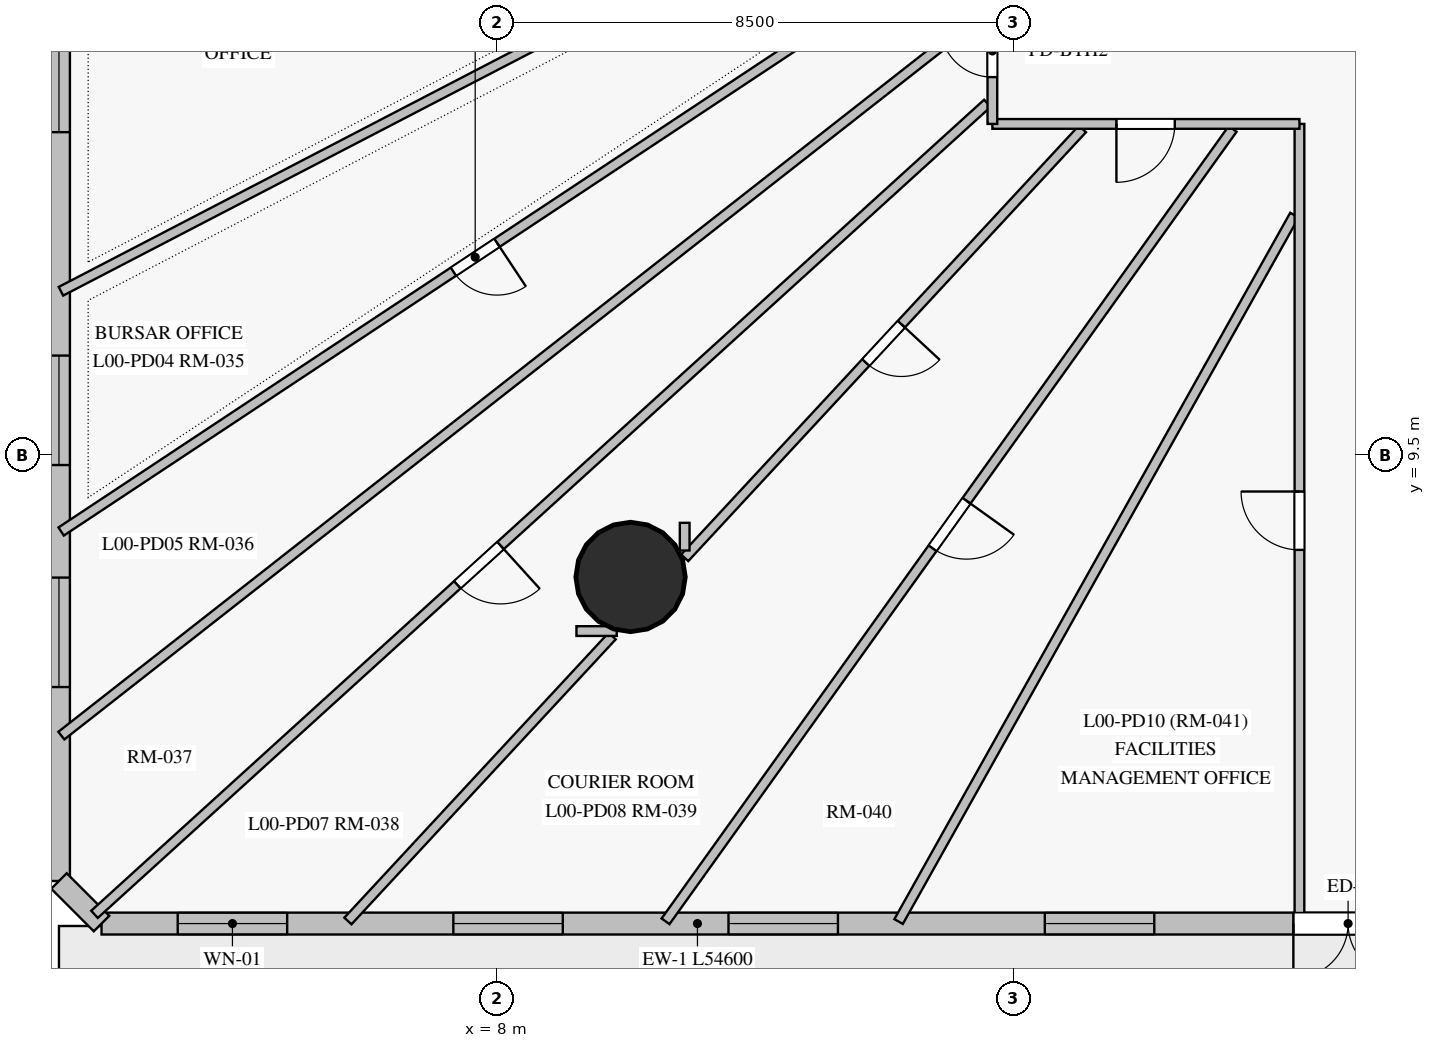
"""IFC4 building model, lengths in metres.
Left out: names, types, materials, properties, quantities, classifications, styles, units other than length and angle.
Written with IfcOpenShell. Run it as: python <this file> out.ifc"""

import sys

from ifc_helpers import new_model, si_unit, direction, frame, frame_2d, origin, origin_with_axes, origin_2d, place, context, subcontext, project, spatial, rectangle, circle, extrude, source, transform, mapped, element, fill, save


model = new_model("IFC4")
c1 = context("Model", 3, precision=1e-05, world=origin(), true_north=direction((0.0, 1.0)))
c2 = subcontext(c1, "Body", "Model", "MODEL_VIEW")
j1 = project(units=[si_unit("LENGTHUNIT", "METRE"), si_unit("PLANEANGLEUNIT", "RADIAN")], contexts=[c1])
p1 = place(None, origin())
s1 = spatial("IfcSite", under=j1, at=p1, CompositionType="ELEMENT")
p2 = place(p1, origin())
s2 = spatial("IfcBuilding", under=s1, at=p2, CompositionType="ELEMENT")
p3 = place(p2, origin())
s3 = spatial("IfcBuildingStorey", under=s2, at=p3, CompositionType="ELEMENT", Elevation=0.0)
m1 = source(origin_with_axes(), c2, "Body", "SweptSolid", [
    extrude(circle(Radius=0.9, at=origin_2d()), origin(), (0.0, 0.0, 1.0), 4.5),
])
p4 = place(p3, frame((10.2, 7.5, 0.0), z_axis=(0.0, 0.0, 1.0), x_axis=(1.0, 0.0, 0.0)))
e1 = element("IfcColumn", 1, at=p4, inside=s3, PredefinedType="COLUMN", context=c2, shape_type="MappedRepresentation", body=[
    mapped(m1, transform((0.0, 0.0, 0.0), scale=1.0)),
])
p5 = place(p3, frame((56.1, 1.8, 0.0), z_axis=(0.0, 0.0, 1.0), x_axis=(-1.0, 0.0, 0.0)))
e2 = element("IfcWall", 2, at=p5, inside=s3, PredefinedType="SOLIDWALL", context=c2, shape_type="SweptSolid", body=[
    extrude(rectangle(XDim=54.6, YDim=0.36, at=frame_2d((27.3, 0.0))), origin(), (0.0, 0.0, 1.0), 4.2),
])
p6 = place(p5, frame((51.547, 0.0, 0.85)))
e3 = element("IfcOpeningElement", 3, at=p6, cuts=e2, PredefinedType="OPENING", context=c2, shape_type="SweptSolid", body=[
    extrude(rectangle(XDim=1.8, YDim=2.2, at=frame_2d((0.9, 1.1))), frame((0.0, 0.19, 0.0), z_axis=(0.0, -1.0, 0.0), x_axis=(1.0, 0.0, 0.0)), (0.0, 0.0, 1.0), 0.38),
])
p7 = place(p5, frame((47.014, 0.0, 0.85)))
e4 = element("IfcOpeningElement", 4, at=p7, cuts=e2, PredefinedType="OPENING", context=c2, shape_type="SweptSolid", body=[
    extrude(rectangle(XDim=1.8, YDim=2.2, at=frame_2d((0.9, 1.1))), frame((0.0, 0.19, 0.0), z_axis=(0.0, -1.0, 0.0), x_axis=(1.0, 0.0, 0.0)), (0.0, 0.0, 1.0), 0.38),
])
p8 = place(p5, frame((42.49, 0.0, 0.85)))
e5 = element("IfcOpeningElement", 5, at=p8, cuts=e2, PredefinedType="OPENING", context=c2, shape_type="SweptSolid", body=[
    extrude(rectangle(XDim=1.8, YDim=2.2, at=frame_2d((0.9, 1.1))), frame((0.0, 0.19, 0.0), z_axis=(0.0, -1.0, 0.0), x_axis=(1.0, 0.0, 0.0)), (0.0, 0.0, 1.0), 0.38),
])
p9 = place(p5, frame((37.288, 0.0, 0.85)))
e6 = element("IfcOpeningElement", 6, at=p9, cuts=e2, PredefinedType="OPENING", context=c2, shape_type="SweptSolid", body=[
    extrude(rectangle(XDim=1.8, YDim=2.2, at=frame_2d((0.9, 1.1))), frame((0.0, 0.19, 0.0), z_axis=(0.0, -1.0, 0.0), x_axis=(1.0, 0.0, 0.0)), (0.0, 0.0, 1.0), 0.38),
])
p10 = place(p5, frame((25.176, 0.0, 0.85)))
e7 = element("IfcOpeningElement", 7, at=p10, cuts=e2, PredefinedType="OPENING", context=c2, shape_type="SweptSolid", body=[
    extrude(rectangle(XDim=1.8, YDim=2.2, at=frame_2d((0.9, 1.1))), frame((0.0, 0.19, 0.0), z_axis=(0.0, -1.0, 0.0), x_axis=(1.0, 0.0, 0.0)), (0.0, 0.0, 1.0), 0.38),
])
p11 = place(p5, frame((17.162, 0.0, 0.85)))
e8 = element("IfcOpeningElement", 8, at=p11, cuts=e2, PredefinedType="OPENING", context=c2, shape_type="SweptSolid", body=[
    extrude(rectangle(XDim=1.8, YDim=2.2, at=frame_2d((0.9, 1.1))), frame((0.0, 0.19, 0.0), z_axis=(0.0, -1.0, 0.0), x_axis=(1.0, 0.0, 0.0)), (0.0, 0.0, 1.0), 0.38),
])
p12 = place(p5, frame((13.244, 0.0, 0.85)))
e9 = element("IfcOpeningElement", 9, at=p12, cuts=e2, PredefinedType="OPENING", context=c2, shape_type="SweptSolid", body=[
    extrude(rectangle(XDim=1.8, YDim=2.2, at=frame_2d((0.9, 1.1))), frame((0.0, 0.19, 0.0), z_axis=(0.0, -1.0, 0.0), x_axis=(1.0, 0.0, 0.0)), (0.0, 0.0, 1.0), 0.38),
])
p13 = place(p5, frame((6.25, 0.0, 0.85)))
e10 = element("IfcOpeningElement", 10, at=p13, cuts=e2, PredefinedType="OPENING", context=c2, shape_type="SweptSolid", body=[
    extrude(rectangle(XDim=1.8, YDim=2.2, at=frame_2d((0.9, 1.1))), frame((0.0, 0.19, 0.0), z_axis=(0.0, -1.0, 0.0), x_axis=(1.0, 0.0, 0.0)), (0.0, 0.0, 1.0), 0.38),
])
p14 = place(p5, frame((1.48, 0.0, 0.85)))
e11 = element("IfcOpeningElement", 11, at=p14, cuts=e2, PredefinedType="OPENING", context=c2, shape_type="SweptSolid", body=[
    extrude(rectangle(XDim=1.8, YDim=2.2, at=frame_2d((0.9, 1.1))), frame((0.0, 0.19, 0.0), z_axis=(0.0, -1.0, 0.0), x_axis=(1.0, 0.0, 0.0)), (0.0, 0.0, 1.0), 0.38),
])
p15 = place(p5, frame((33.2, 0.0, 0.0)))
e12 = element("IfcOpeningElement", 12, at=p15, cuts=e2, PredefinedType="OPENING", context=c2, shape_type="SweptSolid", body=[
    extrude(rectangle(XDim=1.8, YDim=2.3, at=frame_2d((0.9, 1.15))), frame((0.0, 0.19, 0.0), z_axis=(0.0, -1.0, 0.0), x_axis=(1.0, 0.0, 0.0)), (0.0, 0.0, 1.0), 0.38),
])
p16 = place(p5, frame((30.6, 0.0, 0.0)))
e13 = element("IfcOpeningElement", 13, at=p16, cuts=e2, PredefinedType="OPENING", context=c2, shape_type="SweptSolid", body=[
    extrude(rectangle(XDim=1.8, YDim=2.3, at=frame_2d((0.9, 1.15))), frame((0.0, 0.19, 0.0), z_axis=(0.0, -1.0, 0.0), x_axis=(1.0, 0.0, 0.0)), (0.0, 0.0, 1.0), 0.38),
])
p17 = place(p5, frame((10.6, 0.0, 0.0)))
e14 = element("IfcOpeningElement", 14, at=p17, cuts=e2, PredefinedType="OPENING", context=c2, shape_type="SweptSolid", body=[
    extrude(rectangle(XDim=1.8, YDim=2.3, at=frame_2d((0.9, 1.15))), frame((0.0, 0.19, 0.0), z_axis=(0.0, -1.0, 0.0), x_axis=(1.0, 0.0, 0.0)), (0.0, 0.0, 1.0), 0.38),
])
p18 = place(p3, frame((0.8, 2.5, 0.0), z_axis=(0.0, 0.0, 1.0), x_axis=(0.0, 1.0, 0.0)))
e15 = element("IfcWall", 15, at=p18, inside=s3, PredefinedType="SOLIDWALL", context=c2, shape_type="SweptSolid", body=[
    extrude(rectangle(XDim=48.0, YDim=0.36, at=frame_2d((24.0, 0.0))), origin(), (0.0, 0.0, 1.0), 4.2),
])
p19 = place(p18, frame((42.816, 0.0, 0.85)))
e16 = element("IfcOpeningElement", 16, at=p19, cuts=e15, PredefinedType="OPENING", context=c2, shape_type="SweptSolid", body=[
    extrude(rectangle(XDim=1.8, YDim=2.2, at=frame_2d((0.9, 1.1))), frame((0.0, 0.19, 0.0), z_axis=(0.0, -1.0, 0.0), x_axis=(1.0, 0.0, 0.0)), (0.0, 0.0, 1.0), 0.38),
])
p20 = place(p18, frame((38.338, 0.0, 0.85)))
e17 = element("IfcOpeningElement", 17, at=p20, cuts=e15, PredefinedType="OPENING", context=c2, shape_type="SweptSolid", body=[
    extrude(rectangle(XDim=1.8, YDim=2.2, at=frame_2d((0.9, 1.1))), frame((0.0, 0.19, 0.0), z_axis=(0.0, -1.0, 0.0), x_axis=(1.0, 0.0, 0.0)), (0.0, 0.0, 1.0), 0.38),
])
p21 = place(p18, frame((33.194, 0.0, 0.85)))
e18 = element("IfcOpeningElement", 18, at=p21, cuts=e15, PredefinedType="OPENING", context=c2, shape_type="SweptSolid", body=[
    extrude(rectangle(XDim=1.8, YDim=2.2, at=frame_2d((0.9, 1.1))), frame((0.0, 0.19, 0.0), z_axis=(0.0, -1.0, 0.0), x_axis=(1.0, 0.0, 0.0)), (0.0, 0.0, 1.0), 0.38),
])
p22 = place(p18, frame((29.492, 0.0, 0.85)))
e19 = element("IfcOpeningElement", 19, at=p22, cuts=e15, PredefinedType="OPENING", context=c2, shape_type="SweptSolid", body=[
    extrude(rectangle(XDim=1.8, YDim=2.2, at=frame_2d((0.9, 1.1))), frame((0.0, 0.19, 0.0), z_axis=(0.0, -1.0, 0.0), x_axis=(1.0, 0.0, 0.0)), (0.0, 0.0, 1.0), 0.38),
])
p23 = place(p18, frame((24.971, 0.0, 0.85)))
e20 = element("IfcOpeningElement", 20, at=p23, cuts=e15, PredefinedType="OPENING", context=c2, shape_type="SweptSolid", body=[
    extrude(rectangle(XDim=1.8, YDim=2.2, at=frame_2d((0.9, 1.1))), frame((0.0, 0.19, 0.0), z_axis=(0.0, -1.0, 0.0), x_axis=(1.0, 0.0, 0.0)), (0.0, 0.0, 1.0), 0.38),
])
p24 = place(p18, frame((12.315, 0.0, 0.85)))
e21 = element("IfcOpeningElement", 21, at=p24, cuts=e15, PredefinedType="OPENING", context=c2, shape_type="SweptSolid", body=[
    extrude(rectangle(XDim=1.8, YDim=2.2, at=frame_2d((0.9, 1.1))), frame((0.0, 0.19, 0.0), z_axis=(0.0, -1.0, 0.0), x_axis=(1.0, 0.0, 0.0)), (0.0, 0.0, 1.0), 0.38),
])
p25 = place(p18, frame((6.841, 0.0, 0.85)))
e22 = element("IfcOpeningElement", 22, at=p25, cuts=e15, PredefinedType="OPENING", context=c2, shape_type="SweptSolid", body=[
    extrude(rectangle(XDim=1.8, YDim=2.2, at=frame_2d((0.9, 1.1))), frame((0.0, 0.19, 0.0), z_axis=(0.0, -1.0, 0.0), x_axis=(1.0, 0.0, 0.0)), (0.0, 0.0, 1.0), 0.38),
])
p26 = place(p18, frame((3.189, 0.0, 0.85)))
e23 = element("IfcOpeningElement", 23, at=p26, cuts=e15, PredefinedType="OPENING", context=c2, shape_type="SweptSolid", body=[
    extrude(rectangle(XDim=1.8, YDim=2.2, at=frame_2d((0.9, 1.1))), frame((0.0, 0.19, 0.0), z_axis=(0.0, -1.0, 0.0), x_axis=(1.0, 0.0, 0.0)), (0.0, 0.0, 1.0), 0.38),
])
p27 = place(p18, frame((17.2, 0.0, 0.0)))
e24 = element("IfcOpeningElement", 24, at=p27, cuts=e15, PredefinedType="OPENING", context=c2, shape_type="SweptSolid", body=[
    extrude(rectangle(XDim=1.8, YDim=2.3, at=frame_2d((0.9, 1.15))), frame((0.0, 0.19, 0.0), z_axis=(0.0, -1.0, 0.0), x_axis=(1.0, 0.0, 0.0)), (0.0, 0.0, 1.0), 0.38),
])
p28 = place(p3, frame((0.8, 2.5, 0.0), z_axis=(0.0, 0.0, 1.0), x_axis=(0.707106781187, -0.707106781187, 0.0)))
e25 = element("IfcWall", 25, at=p28, inside=s3, PredefinedType="SOLIDWALL", context=c2, shape_type="SweptSolid", body=[
    extrude(rectangle(XDim=0.99, YDim=0.36, at=frame_2d((0.495, 0.0))), origin(), (0.0, 0.0, 1.0), 4.2),
])
p29 = place(p3, frame((16.068, 15.289, 0.0), z_axis=(0.0, 0.0, 1.0), x_axis=(-0.740229029454, -0.672354805109, 0.0)))
e26 = element("IfcWall", 26, at=p29, inside=s3, PredefinedType="PARTITIONING", context=c2, shape_type="SweptSolid", body=[
    extrude(rectangle(XDim=19.837, YDim=0.16, at=frame_2d((9.918, 0.0))), origin(), (0.0, 0.0, 1.0), 3.25),
])
p30 = place(p29, frame((10.816, 0.0, 0.0)))
e27 = element("IfcOpeningElement", 27, at=p30, cuts=e26, PredefinedType="OPENING", context=c2, shape_type="SweptSolid", body=[
    extrude(rectangle(XDim=0.96, YDim=2.15, at=frame_2d((0.48, 1.075))), frame((0.0, 0.09, 0.0), z_axis=(0.0, -1.0, 0.0), x_axis=(1.0, 0.0, 0.0)), (0.0, 0.0, 1.0), 0.18),
])
p31 = place(p3, frame((16.068, 16.83, 0.0), z_axis=(0.0, 0.0, 1.0), x_axis=(-0.786986378296, -0.616970372366, 0.0)))
e28 = element("IfcWall", 28, at=p31, inside=s3, PredefinedType="PARTITIONING", context=c2, shape_type="SweptSolid", body=[
    extrude(rectangle(XDim=19.351, YDim=0.16, at=frame_2d((9.676, 0.0))), origin(), (0.0, 0.0, 1.0), 4.2),
])
p32 = place(p3, frame((14.454, 17.268, 0.0), z_axis=(0.0, 0.0, 1.0), x_axis=(-0.83369067589, -0.55223170584, 0.0)))
e29 = element("IfcWall", 29, at=p32, inside=s3, PredefinedType="PARTITIONING", context=c2, shape_type="SweptSolid", body=[
    extrude(rectangle(XDim=16.335, YDim=0.16, at=frame_2d((8.167, 0.0))), origin(), (0.0, 0.0, 1.0), 4.2),
])
p33 = place(p32, frame((7.737, 0.0, 0.0)))
e30 = element("IfcOpeningElement", 30, at=p33, cuts=e29, PredefinedType="OPENING", context=c2, shape_type="SweptSolid", body=[
    extrude(rectangle(XDim=0.86, YDim=2.04, at=frame_2d((0.43, 1.02))), frame((0.0, 0.09, 0.0), z_axis=(0.0, -1.0, 0.0), x_axis=(1.0, 0.0, 0.0)), (0.0, 0.0, 1.0), 0.18),
])
p34 = place(p3, frame((20.101, 14.868, 0.0), z_axis=(0.0, 0.0, 1.0), x_axis=(-0.581991703878, -0.813194722448, 0.0)))
e31 = element("IfcWall", 31, at=p34, inside=s3, PredefinedType="PARTITIONING", context=c2, shape_type="SweptSolid", body=[
    extrude(rectangle(XDim=16.024, YDim=0.16, at=frame_2d((8.012, 0.0))), origin(), (0.0, 0.0, 1.0), 4.2),
])
p35 = place(p34, frame((7.52, 0.0, 0.0)))
e32 = element("IfcOpeningElement", 32, at=p35, cuts=e31, PredefinedType="OPENING", context=c2, shape_type="SweptSolid", body=[
    extrude(rectangle(XDim=0.96, YDim=2.15, at=frame_2d((0.48, 1.075))), frame((0.0, 0.09, 0.0), z_axis=(0.0, -1.0, 0.0), x_axis=(1.0, 0.0, 0.0)), (0.0, 0.0, 1.0), 0.18),
])
p36 = place(p3, frame((21.118, 13.45, 0.0), z_axis=(0.0, 0.0, 1.0), x_axis=(-0.488869643444, -0.872356848841, 0.0)))
e33 = element("IfcWall", 33, at=p36, inside=s3, PredefinedType="PARTITIONING", context=c2, shape_type="SweptSolid", body=[
    extrude(rectangle(XDim=13.316, YDim=0.16, at=frame_2d((6.658, 0.0))), origin(), (0.0, 0.0, 1.0), 4.2),
])
p37 = place(p3, frame((21.2, 1.965, 0.0), z_axis=(0.0, 0.0, 1.0), x_axis=(0.0, 1.0, 0.0)))
e34 = element("IfcWall", 34, at=p37, inside=s3, PredefinedType="PARTITIONING", context=c2, shape_type="SweptSolid", body=[
    extrude(rectangle(XDim=12.985, YDim=0.16, at=frame_2d((6.492, 0.0))), origin(), (0.0, 0.0, 1.0), 4.2),
])
p38 = place(p37, frame((5.98, 0.0, 0.0)))
e35 = element("IfcOpeningElement", 35, at=p38, cuts=e34, PredefinedType="OPENING", context=c2, shape_type="SweptSolid", body=[
    extrude(rectangle(XDim=0.96, YDim=2.15, at=frame_2d((0.48, 1.075))), frame((0.0, 0.09, 0.0), z_axis=(0.0, -1.0, 0.0), x_axis=(1.0, 0.0, 0.0)), (0.0, 0.0, 1.0), 0.18),
])
p39 = place(p3, frame((10.827, 17.389, 0.0), z_axis=(0.0, 0.0, 1.0), x_axis=(-0.8874495265, -0.460904912009, 0.0)))
e36 = element("IfcWall", 36, at=p39, inside=s3, PredefinedType="PARTITIONING", context=c2, shape_type="SweptSolid", body=[
    extrude(rectangle(XDim=11.262, YDim=0.16, at=frame_2d((5.631, 0.0))), origin(), (0.0, 0.0, 1.0), 4.2),
])
p40 = place(p3, frame((17.631, 14.868, 0.0), z_axis=(0.0, 0.0, 1.0), x_axis=(-0.679969088338, -0.733240778261, 0.0)))
e37 = element("IfcWall", 37, at=p40, inside=s3, PredefinedType="PARTITIONING", context=c2, shape_type="SweptSolid", body=[
    extrude(rectangle(XDim=9.62, YDim=0.16, at=frame_2d((4.81, 0.0))), origin(), (0.0, 0.0, 1.0), 3.25),
])
p41 = place(p40, frame((4.38, 0.0, 0.0)))
e38 = element("IfcOpeningElement", 38, at=p41, cuts=e37, PredefinedType="OPENING", context=c2, shape_type="SweptSolid", body=[
    extrude(rectangle(XDim=0.86, YDim=2.04, at=frame_2d((0.43, 1.02))), frame((0.0, 0.09, 0.0), z_axis=(0.0, -1.0, 0.0), x_axis=(1.0, 0.0, 0.0)), (0.0, 0.0, 1.0), 0.18),
])
p42 = place(p3, frame((9.897, 6.528, 0.0), z_axis=(0.0, 0.0, 1.0), x_axis=(-0.679977657187, -0.733232831866, 0.0)))
e39 = element("IfcWall", 39, at=p42, inside=s3, PredefinedType="PARTITIONING", context=c2, shape_type="SweptSolid", body=[
    extrude(rectangle(XDim=6.391, YDim=0.16, at=frame_2d((3.195, 0.0))), origin(), (0.0, 0.0, 1.0), 4.2),
])
p43 = place(p3, frame((21.2, 14.95, 0.0), z_axis=(0.0, 0.0, 1.0), x_axis=(-1.0, 0.0, 0.0)))
e40 = element("IfcWall", 40, at=p43, inside=s3, PredefinedType="PARTITIONING", context=c2, shape_type="SweptSolid", body=[
    extrude(rectangle(XDim=5.05, YDim=0.16, at=frame_2d((2.525, 0.0))), origin(), (0.0, 0.0, 1.0), 4.2),
])
p44 = place(p43, frame((2.05, 0.0, 0.0)))
e41 = element("IfcOpeningElement", 41, at=p44, cuts=e40, PredefinedType="OPENING", context=c2, shape_type="SweptSolid", body=[
    extrude(rectangle(XDim=0.96, YDim=2.15, at=frame_2d((0.48, 1.075))), frame((0.0, 0.09, 0.0), z_axis=(0.0, -1.0, 0.0), x_axis=(1.0, 0.0, 0.0)), (0.0, 0.0, 1.0), 0.18),
])
p45 = place(p3, frame((16.15, 14.95, 0.0), z_axis=(0.0, 0.0, 1.0), x_axis=(0.0, 1.0, 0.0)))
e42 = element("IfcWall", 42, at=p45, inside=s3, PredefinedType="PARTITIONING", context=c2, shape_type="SweptSolid", body=[
    extrude(rectangle(XDim=2.4, YDim=0.16, at=frame_2d((1.2, 0.0))), origin(), (0.0, 0.0, 1.0), 3.25),
])
p46 = place(p45, frame((0.77, 0.0, 0.0)))
e43 = element("IfcOpeningElement", 43, at=p46, cuts=e42, PredefinedType="OPENING", context=c2, shape_type="SweptSolid", body=[
    extrude(rectangle(XDim=0.86, YDim=2.04, at=frame_2d((0.43, 1.02))), frame((0.0, 0.09, 0.0), z_axis=(0.0, -1.0, 0.0), x_axis=(1.0, 0.0, 0.0)), (0.0, 0.0, 1.0), 0.18),
])
p47 = place(p3, frame((9.31, 6.61, 0.0), z_axis=(0.0, 0.0, 1.0), x_axis=(1.0, 0.0, 0.0)))
e44 = element("IfcWall", 44, at=p47, inside=s3, PredefinedType="PARTITIONING", context=c2, shape_type="SweptSolid", body=[
    extrude(rectangle(XDim=0.663, YDim=0.16, at=frame_2d((0.332, 0.0))), origin(), (0.0, 0.0, 1.0), 4.2),
])
p48 = place(p3, frame((11.09, 7.935, 0.0), z_axis=(0.0, 0.0, 1.0), x_axis=(0.0, 1.0, 0.0)))
e45 = element("IfcWall", 45, at=p48, inside=s3, PredefinedType="PARTITIONING", context=c2, shape_type="SweptSolid", body=[
    extrude(rectangle(XDim=0.455, YDim=0.16, at=frame_2d((0.228, 0.0))), origin(), (0.0, 0.0, 1.0), 3.25),
])
m2 = source(origin_with_axes(), c2, "Body", "SweptSolid", [
    extrude(rectangle(XDim=1.8, YDim=2.2, at=frame_2d((0.9, 1.1))), frame((0.0, 0.03, 0.0), z_axis=(0.0, -1.0, 0.0), x_axis=(1.0, 0.0, 0.0)), (0.0, 0.0, 1.0), 0.06),
])
p49 = place(p6, origin())
e46 = element("IfcWindow", 46, at=p49, inside=s3, PartitioningType="SINGLE_PANEL", PredefinedType="WINDOW", context=c2, shape_type="MappedRepresentation", body=[
    mapped(m2, transform((0.0, 0.0, 0.0), scale=1.0)),
])
fill(e3, e46)
p50 = place(p7, origin())
e47 = element("IfcWindow", 47, at=p50, inside=s3, PartitioningType="SINGLE_PANEL", PredefinedType="WINDOW", context=c2, shape_type="MappedRepresentation", body=[
    mapped(m2, transform((0.0, 0.0, 0.0), scale=1.0)),
])
fill(e4, e47)
p51 = place(p8, origin())
e48 = element("IfcWindow", 48, at=p51, inside=s3, PartitioningType="SINGLE_PANEL", PredefinedType="WINDOW", context=c2, shape_type="MappedRepresentation", body=[
    mapped(m2, transform((0.0, 0.0, 0.0), scale=1.0)),
])
fill(e5, e48)
p52 = place(p9, origin())
e49 = element("IfcWindow", 49, at=p52, inside=s3, PartitioningType="SINGLE_PANEL", PredefinedType="WINDOW", context=c2, shape_type="MappedRepresentation", body=[
    mapped(m2, transform((0.0, 0.0, 0.0), scale=1.0)),
])
fill(e6, e49)
p53 = place(p24, origin())
e50 = element("IfcWindow", 50, at=p53, inside=s3, PartitioningType="SINGLE_PANEL", PredefinedType="WINDOW", context=c2, shape_type="MappedRepresentation", body=[
    mapped(m2, transform((0.0, 0.0, 0.0), scale=1.0)),
])
fill(e21, e50)
p54 = place(p25, origin())
e51 = element("IfcWindow", 51, at=p54, inside=s3, PartitioningType="SINGLE_PANEL", PredefinedType="WINDOW", context=c2, shape_type="MappedRepresentation", body=[
    mapped(m2, transform((0.0, 0.0, 0.0), scale=1.0)),
])
fill(e22, e51)
p55 = place(p26, origin())
e52 = element("IfcWindow", 52, at=p55, inside=s3, PartitioningType="SINGLE_PANEL", PredefinedType="WINDOW", context=c2, shape_type="MappedRepresentation", body=[
    mapped(m2, transform((0.0, 0.0, 0.0), scale=1.0)),
])
fill(e23, e52)
m3 = source(origin_with_axes(), c2, "Body", "SweptSolid", [
    extrude(rectangle(XDim=1.8, YDim=2.3, at=frame_2d((0.9, 1.15))), frame((0.0, 0.025, 0.0), z_axis=(0.0, -1.0, 0.0), x_axis=(1.0, 0.0, 0.0)), (0.0, 0.0, 1.0), 0.05),
])
p56 = place(p15, origin())
e53 = element("IfcDoor", 53, at=p56, inside=s3, OperationType="DOUBLE_DOOR_SINGLE_SWING", PredefinedType="DOOR", context=c2, shape_type="MappedRepresentation", body=[
    mapped(m3, transform((0.0, 0.0, 0.0), scale=1.0)),
])
fill(e12, e53)
m4 = source(origin_with_axes(), c2, "Body", "SweptSolid", [
    extrude(rectangle(XDim=0.96, YDim=2.15, at=frame_2d((0.48, 1.075))), frame((0.0, 0.025, 0.0), z_axis=(0.0, -1.0, 0.0), x_axis=(1.0, 0.0, 0.0)), (0.0, 0.0, 1.0), 0.05),
])
p57 = place(p30, origin())
e54 = element("IfcDoor", 54, at=p57, inside=s3, OperationType="SINGLE_SWING_LEFT", PredefinedType="DOOR", context=c2, shape_type="MappedRepresentation", body=[
    mapped(m4, transform((0.0, 0.0, 0.0), scale=1.0)),
])
fill(e27, e54)
p58 = place(p44, origin())
e55 = element("IfcDoor", 55, at=p58, inside=s3, OperationType="SINGLE_SWING_RIGHT", PredefinedType="DOOR", context=c2, shape_type="MappedRepresentation", body=[
    mapped(m4, transform((0.0, 0.0, 0.0), scale=1.0)),
])
fill(e41, e55)
p59 = place(p35, origin())
e56 = element("IfcDoor", 56, at=p59, inside=s3, OperationType="SINGLE_SWING_LEFT", PredefinedType="DOOR", context=c2, shape_type="MappedRepresentation", body=[
    mapped(m4, transform((0.0, 0.0, 0.0), scale=1.0)),
])
fill(e32, e56)
p60 = place(p38, origin())
e57 = element("IfcDoor", 57, at=p60, inside=s3, OperationType="SINGLE_SWING_RIGHT", PredefinedType="DOOR", context=c2, shape_type="MappedRepresentation", body=[
    mapped(m4, transform((0.0, 0.0, 0.0), scale=1.0)),
])
fill(e35, e57)
m5 = source(origin_with_axes(), c2, "Body", "SweptSolid", [
    extrude(rectangle(XDim=0.86, YDim=2.04, at=frame_2d((0.43, 1.02))), frame((0.0, 0.025, 0.0), z_axis=(0.0, -1.0, 0.0), x_axis=(1.0, 0.0, 0.0)), (0.0, 0.0, 1.0), 0.05),
])
p61 = place(p33, origin())
e58 = element("IfcDoor", 58, at=p61, inside=s3, OperationType="SINGLE_SWING_LEFT", PredefinedType="DOOR", context=c2, shape_type="MappedRepresentation", body=[
    mapped(m5, transform((0.0, 0.0, 0.0), scale=1.0)),
])
fill(e30, e58)
p62 = place(p46, origin())
e59 = element("IfcDoor", 59, at=p62, inside=s3, OperationType="SINGLE_SWING_RIGHT", PredefinedType="DOOR", context=c2, shape_type="MappedRepresentation", body=[
    mapped(m5, transform((0.0, 0.0, 0.0), scale=1.0)),
])
fill(e43, e59)
p63 = place(p41, origin())
e60 = element("IfcDoor", 60, at=p63, inside=s3, OperationType="SINGLE_SWING_LEFT", PredefinedType="DOOR", context=c2, shape_type="MappedRepresentation", body=[
    mapped(m5, transform((0.0, 0.0, 0.0), scale=1.0)),
])
fill(e38, e60)
save(model, sys.argv[1])
